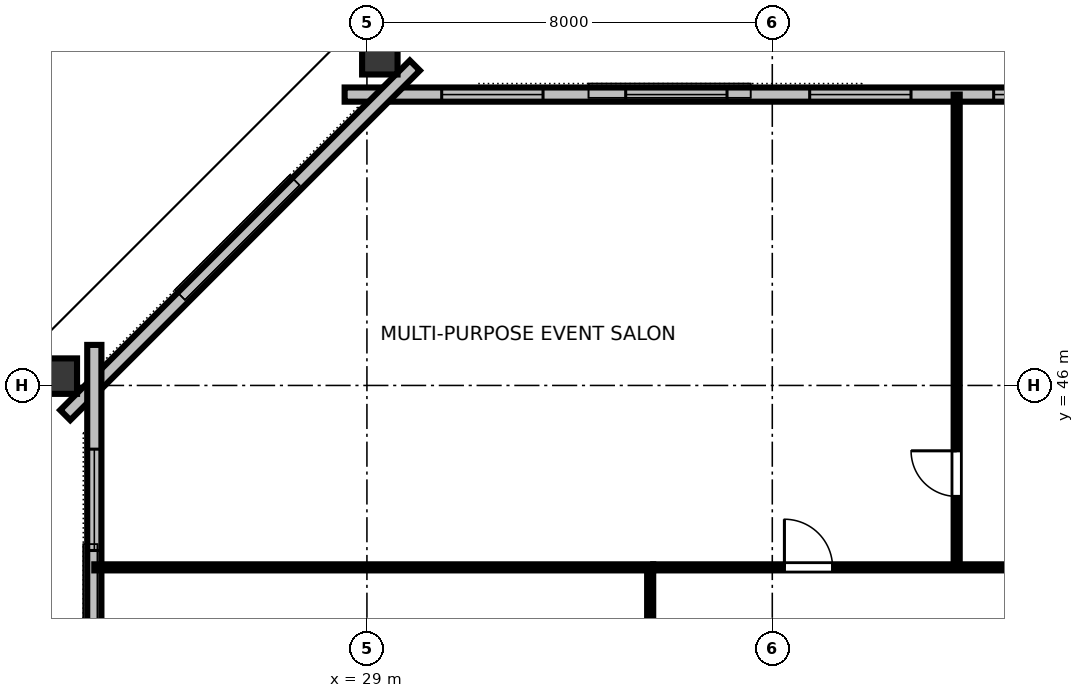
"""IFC4 building model, lengths in metres.
Left out: names, types, materials, properties, quantities, classifications, styles, units other than length and angle.
Written with IfcOpenShell. Run it as: python <this file> out.ifc"""

import sys

from ifc_helpers import new_model, si_unit, direction, frame, frame_2d, origin, origin_2d, place, context, subcontext, project, spatial, rectangle, hollow_rectangle, extrude, element, fill, save


model = new_model("IFC4")
c1 = context("Model", 3, precision=1e-05, world=origin(), true_north=direction((0.0, 1.0)))
c2 = subcontext(c1, "Body", "Model", "MODEL_VIEW")
j1 = project(units=[si_unit("LENGTHUNIT", "METRE"), si_unit("PLANEANGLEUNIT", "RADIAN")], contexts=[c1])
p1 = place(None, origin())
s1 = spatial("IfcSite", under=j1, at=p1, CompositionType="ELEMENT")
p2 = place(p1, origin())
s2 = spatial("IfcBuilding", under=s1, at=p2, CompositionType="ELEMENT")
p3 = place(p2, frame((0.0, 0.0, 177.0)))
s3 = spatial("IfcBuildingStorey", under=s2, at=p3, CompositionType="ELEMENT", Elevation=177.0)
for number, where, z_axis, x_axis in (
    (1, (29.255, 52.562, 0.0), (0.0, 0.0, 1.0), (1.0, 0.0, 0.0)),
    (2, (22.854, 46.184, 0.0), (0.0, 0.0, 1.0), (0.0, 1.0, 0.0)),
):
    element("IfcColumn", number, at=place(p3, frame(where, z_axis=z_axis, x_axis=x_axis)), inside=s3, PredefinedType="COLUMN", context=c2, shape_type="SweptSolid", body=[
        extrude(hollow_rectangle(XDim=0.7, YDim=0.85, WallThickness=0.04, at=origin_2d()), origin(), (0.0, 0.0, 1.0), 3.358),
    ])
p4 = place(p3, frame((63.44, 51.74, 0.0), z_axis=(0.0, 0.0, 1.0), x_axis=(-1.0, 0.0, 0.0)))
e3 = element("IfcWall", 3, at=p4, inside=s3, PredefinedType="STANDARD", context=c2, shape_type="SweptSolid", body=[
    extrude(rectangle(XDim=34.88, YDim=0.28, at=frame_2d((17.44, 0.0))), origin(), (0.0, 0.0, 1.0), 3.36),
])
p5 = place(p4, frame((1.916, 0.0, 0.8)))
e4 = element("IfcOpeningElement", 4, at=p5, cuts=e3, PredefinedType="OPENING", context=c2, shape_type="SweptSolid", body=[
    extrude(rectangle(XDim=2.0, YDim=1.95, at=frame_2d((1.0, 0.975))), frame((0.0, 0.15, 0.0), z_axis=(0.0, -1.0, 0.0), x_axis=(1.0, 0.0, 0.0)), (0.0, 0.0, 1.0), 0.3),
])
p6 = place(p4, frame((5.547, 0.0, 0.8)))
e5 = element("IfcOpeningElement", 5, at=p6, cuts=e3, PredefinedType="OPENING", context=c2, shape_type="SweptSolid", body=[
    extrude(rectangle(XDim=2.0, YDim=1.95, at=frame_2d((1.0, 0.975))), frame((0.0, 0.15, 0.0), z_axis=(0.0, -1.0, 0.0), x_axis=(1.0, 0.0, 0.0)), (0.0, 0.0, 1.0), 0.3),
])
p7 = place(p4, frame((9.178, 0.0, 0.8)))
e6 = element("IfcOpeningElement", 6, at=p7, cuts=e3, PredefinedType="OPENING", context=c2, shape_type="SweptSolid", body=[
    extrude(rectangle(XDim=2.0, YDim=1.95, at=frame_2d((1.0, 0.975))), frame((0.0, 0.15, 0.0), z_axis=(0.0, -1.0, 0.0), x_axis=(1.0, 0.0, 0.0)), (0.0, 0.0, 1.0), 0.3),
])
p8 = place(p4, frame((12.809, 0.0, 0.8)))
e7 = element("IfcOpeningElement", 7, at=p8, cuts=e3, PredefinedType="OPENING", context=c2, shape_type="SweptSolid", body=[
    extrude(rectangle(XDim=2.0, YDim=1.95, at=frame_2d((1.0, 0.975))), frame((0.0, 0.15, 0.0), z_axis=(0.0, -1.0, 0.0), x_axis=(1.0, 0.0, 0.0)), (0.0, 0.0, 1.0), 0.3),
])
p9 = place(p4, frame((20.071, 0.0, 0.8)))
e8 = element("IfcOpeningElement", 8, at=p9, cuts=e3, PredefinedType="OPENING", context=c2, shape_type="SweptSolid", body=[
    extrude(rectangle(XDim=2.0, YDim=1.95, at=frame_2d((1.0, 0.975))), frame((0.0, 0.15, 0.0), z_axis=(0.0, -1.0, 0.0), x_axis=(1.0, 0.0, 0.0)), (0.0, 0.0, 1.0), 0.3),
])
p10 = place(p4, frame((23.702, 0.0, 0.8)))
e9 = element("IfcOpeningElement", 9, at=p10, cuts=e3, PredefinedType="OPENING", context=c2, shape_type="SweptSolid", body=[
    extrude(rectangle(XDim=2.0, YDim=1.95, at=frame_2d((1.0, 0.975))), frame((0.0, 0.15, 0.0), z_axis=(0.0, -1.0, 0.0), x_axis=(1.0, 0.0, 0.0)), (0.0, 0.0, 1.0), 0.3),
])
p11 = place(p4, frame((27.333, 0.0, 0.8)))
e10 = element("IfcOpeningElement", 10, at=p11, cuts=e3, PredefinedType="OPENING", context=c2, shape_type="SweptSolid", body=[
    extrude(rectangle(XDim=2.0, YDim=1.95, at=frame_2d((1.0, 0.975))), frame((0.0, 0.15, 0.0), z_axis=(0.0, -1.0, 0.0), x_axis=(1.0, 0.0, 0.0)), (0.0, 0.0, 1.0), 0.3),
])
p12 = place(p4, frame((30.964, 0.0, 0.8)))
e11 = element("IfcOpeningElement", 11, at=p12, cuts=e3, PredefinedType="OPENING", context=c2, shape_type="SweptSolid", body=[
    extrude(rectangle(XDim=2.0, YDim=1.95, at=frame_2d((1.0, 0.975))), frame((0.0, 0.15, 0.0), z_axis=(0.0, -1.0, 0.0), x_axis=(1.0, 0.0, 0.0)), (0.0, 0.0, 1.0), 0.3),
])
p13 = place(p3, frame((29.946, 52.314, 0.0), z_axis=(0.0, 0.0, 1.0), x_axis=(-0.707106781187, -0.707106781187, 0.0)))
e12 = element("IfcWall", 12, at=p13, inside=s3, PredefinedType="STANDARD", context=c2, shape_type="SweptSolid", body=[
    extrude(rectangle(XDim=9.757, YDim=0.28, at=frame_2d((4.879, 0.0))), origin(), (0.0, 0.0, 1.0), 3.36),
])
p14 = place(p3, frame((23.62, 46.8, 0.0), z_axis=(0.0, 0.0, 1.0), x_axis=(0.0, -1.0, 0.0)))
e13 = element("IfcWall", 13, at=p14, inside=s3, PredefinedType="STANDARD", context=c2, shape_type="SweptSolid", body=[
    extrude(rectangle(XDim=29.6, YDim=0.28, at=frame_2d((14.8, 0.0))), origin(), (0.0, 0.0, 1.0), 3.36),
])
p15 = place(p14, frame((2.057, 0.0, 0.8)))
e14 = element("IfcOpeningElement", 14, at=p15, cuts=e13, PredefinedType="OPENING", context=c2, shape_type="SweptSolid", body=[
    extrude(rectangle(XDim=2.0, YDim=1.95, at=frame_2d((1.0, 0.975))), frame((0.0, 0.15, 0.0), z_axis=(0.0, -1.0, 0.0), x_axis=(1.0, 0.0, 0.0)), (0.0, 0.0, 1.0), 0.3),
])
p16 = place(p14, frame((5.971, 0.0, 0.8)))
e15 = element("IfcOpeningElement", 15, at=p16, cuts=e13, PredefinedType="OPENING", context=c2, shape_type="SweptSolid", body=[
    extrude(rectangle(XDim=2.0, YDim=1.95, at=frame_2d((1.0, 0.975))), frame((0.0, 0.15, 0.0), z_axis=(0.0, -1.0, 0.0), x_axis=(1.0, 0.0, 0.0)), (0.0, 0.0, 1.0), 0.3),
])
p17 = place(p14, frame((9.886, 0.0, 0.8)))
e16 = element("IfcOpeningElement", 16, at=p17, cuts=e13, PredefinedType="OPENING", context=c2, shape_type="SweptSolid", body=[
    extrude(rectangle(XDim=2.0, YDim=1.95, at=frame_2d((1.0, 0.975))), frame((0.0, 0.15, 0.0), z_axis=(0.0, -1.0, 0.0), x_axis=(1.0, 0.0, 0.0)), (0.0, 0.0, 1.0), 0.3),
])
p18 = place(p14, frame((17.714, 0.0, 0.8)))
e17 = element("IfcOpeningElement", 17, at=p18, cuts=e13, PredefinedType="OPENING", context=c2, shape_type="SweptSolid", body=[
    extrude(rectangle(XDim=2.0, YDim=1.95, at=frame_2d((1.0, 0.975))), frame((0.0, 0.15, 0.0), z_axis=(0.0, -1.0, 0.0), x_axis=(1.0, 0.0, 0.0)), (0.0, 0.0, 1.0), 0.3),
])
p19 = place(p14, frame((21.629, 0.0, 0.8)))
e18 = element("IfcOpeningElement", 18, at=p19, cuts=e13, PredefinedType="OPENING", context=c2, shape_type="SweptSolid", body=[
    extrude(rectangle(XDim=2.0, YDim=1.95, at=frame_2d((1.0, 0.975))), frame((0.0, 0.15, 0.0), z_axis=(0.0, -1.0, 0.0), x_axis=(1.0, 0.0, 0.0)), (0.0, 0.0, 1.0), 0.3),
])
p20 = place(p14, frame((25.543, 0.0, 0.8)))
e19 = element("IfcOpeningElement", 19, at=p20, cuts=e13, PredefinedType="OPENING", context=c2, shape_type="SweptSolid", body=[
    extrude(rectangle(XDim=2.0, YDim=1.95, at=frame_2d((1.0, 0.975))), frame((0.0, 0.15, 0.0), z_axis=(0.0, -1.0, 0.0), x_axis=(1.0, 0.0, 0.0)), (0.0, 0.0, 1.0), 0.3),
])
p21 = place(p3, frame((40.639, 42.41, 0.0), z_axis=(0.0, 0.0, 1.0), x_axis=(0.0, 1.0, 0.0)))
e20 = element("IfcWall", 20, at=p21, inside=s3, PredefinedType="PARTITIONING", context=c2, shape_type="SweptSolid", body=[
    extrude(rectangle(XDim=9.33, YDim=0.12, at=frame_2d((4.665, 0.0))), origin(), (0.0, 0.0, 1.0), 2.64),
])
p22 = place(p21, frame((1.4, 0.0, 0.0)))
e21 = element("IfcOpeningElement", 21, at=p22, cuts=e20, PredefinedType="OPENING", context=c2, shape_type="SweptSolid", body=[
    extrude(rectangle(XDim=0.9, YDim=2.15, at=frame_2d((0.45, 1.075))), frame((0.0, 0.07, 0.0), z_axis=(0.0, -1.0, 0.0), x_axis=(1.0, 0.0, 0.0)), (0.0, 0.0, 1.0), 0.14),
])
p23 = place(p3, frame((34.65, 42.41, 0.0), z_axis=(0.0, 0.0, 1.0), x_axis=(1.0, 0.0, 0.0)))
e22 = element("IfcWall", 22, at=p23, inside=s3, PredefinedType="PARTITIONING", context=c2, shape_type="SweptSolid", body=[
    extrude(rectangle(XDim=10.33, YDim=0.12, at=frame_2d((5.165, 0.0))), origin(), (0.0, 0.0, 1.0), 2.64),
])
p24 = place(p23, frame((2.59, 0.0, 0.0)))
e23 = element("IfcOpeningElement", 23, at=p24, cuts=e22, PredefinedType="OPENING", context=c2, shape_type="SweptSolid", body=[
    extrude(rectangle(XDim=0.95, YDim=2.15, at=frame_2d((0.475, 1.075))), frame((0.0, 0.07, 0.0), z_axis=(0.0, -1.0, 0.0), x_axis=(1.0, 0.0, 0.0)), (0.0, 0.0, 1.0), 0.14),
])
p25 = place(p23, frame((7.685, 0.0, 0.0)))
e24 = element("IfcOpeningElement", 24, at=p25, cuts=e22, PredefinedType="OPENING", context=c2, shape_type="SweptSolid", body=[
    extrude(rectangle(XDim=0.95, YDim=2.15, at=frame_2d((0.475, 1.075))), frame((0.0, 0.07, 0.0), z_axis=(0.0, -1.0, 0.0), x_axis=(1.0, 0.0, 0.0)), (0.0, 0.0, 1.0), 0.14),
])
p26 = place(p3, frame((34.59, 21.65, 0.0), z_axis=(0.0, 0.0, 1.0), x_axis=(0.0, 1.0, 0.0)))
e25 = element("IfcWall", 25, at=p26, inside=s3, PredefinedType="PARTITIONING", context=c2, shape_type="SweptSolid", body=[
    extrude(rectangle(XDim=20.7, YDim=0.12, at=frame_2d((10.35, 0.0))), origin(), (0.0, 0.0, 1.0), 2.64),
])
p27 = place(p26, frame((9.875, 0.0, 0.0)))
e26 = element("IfcOpeningElement", 26, at=p27, cuts=e25, PredefinedType="OPENING", context=c2, shape_type="SweptSolid", body=[
    extrude(rectangle(XDim=0.95, YDim=2.15, at=frame_2d((0.475, 1.075))), frame((0.0, 0.07, 0.0), z_axis=(0.0, -1.0, 0.0), x_axis=(1.0, 0.0, 0.0)), (0.0, 0.0, 1.0), 0.14),
])
p28 = place(p3, frame((34.65, 42.41, 0.0), z_axis=(0.0, 0.0, 1.0), x_axis=(-1.0, 0.0, 0.0)))
e27 = element("IfcWall", 27, at=p28, inside=s3, PredefinedType="PARTITIONING", context=c2, shape_type="SweptSolid", body=[
    extrude(rectangle(XDim=11.03, YDim=0.12, at=frame_2d((5.515, 0.0))), origin(), (0.0, 0.0, 1.0), 2.64),
])
p29 = place(p9, origin())
e28 = element("IfcWindow", 28, at=p29, inside=s3, PartitioningType="SINGLE_PANEL", PredefinedType="WINDOW", context=c2, shape_type="SweptSolid", body=[
    extrude(rectangle(XDim=2.0, YDim=1.95, at=frame_2d((1.0, 0.975))), frame((0.0, 0.03, 0.0), z_axis=(0.0, -1.0, 0.0), x_axis=(1.0, 0.0, 0.0)), (0.0, 0.0, 1.0), 0.06),
])
fill(e8, e28)
p30 = place(p10, origin())
e29 = element("IfcWindow", 29, at=p30, inside=s3, PartitioningType="SINGLE_PANEL", PredefinedType="WINDOW", context=c2, shape_type="SweptSolid", body=[
    extrude(rectangle(XDim=2.0, YDim=1.95, at=frame_2d((1.0, 0.975))), frame((0.0, 0.03, 0.0), z_axis=(0.0, -1.0, 0.0), x_axis=(1.0, 0.0, 0.0)), (0.0, 0.0, 1.0), 0.06),
])
fill(e9, e29)
p31 = place(p11, origin())
e30 = element("IfcWindow", 30, at=p31, inside=s3, PartitioningType="SINGLE_PANEL", PredefinedType="WINDOW", context=c2, shape_type="SweptSolid", body=[
    extrude(rectangle(XDim=2.0, YDim=1.95, at=frame_2d((1.0, 0.975))), frame((0.0, 0.03, 0.0), z_axis=(0.0, -1.0, 0.0), x_axis=(1.0, 0.0, 0.0)), (0.0, 0.0, 1.0), 0.06),
])
fill(e10, e30)
p32 = place(p12, origin())
e31 = element("IfcWindow", 31, at=p32, inside=s3, PartitioningType="SINGLE_PANEL", PredefinedType="WINDOW", context=c2, shape_type="SweptSolid", body=[
    extrude(rectangle(XDim=2.0, YDim=1.95, at=frame_2d((1.0, 0.975))), frame((0.0, 0.03, 0.0), z_axis=(0.0, -1.0, 0.0), x_axis=(1.0, 0.0, 0.0)), (0.0, 0.0, 1.0), 0.06),
])
fill(e11, e31)
p33 = place(p15, origin())
e32 = element("IfcWindow", 32, at=p33, inside=s3, PartitioningType="SINGLE_PANEL", PredefinedType="WINDOW", context=c2, shape_type="SweptSolid", body=[
    extrude(rectangle(XDim=2.0, YDim=1.95, at=frame_2d((1.0, 0.975))), frame((0.0, 0.03, 0.0), z_axis=(0.0, -1.0, 0.0), x_axis=(1.0, 0.0, 0.0)), (0.0, 0.0, 1.0), 0.06),
])
fill(e14, e32)
p34 = place(p22, origin())
e33 = element("IfcDoor", 33, at=p34, inside=s3, OperationType="SINGLE_SWING_RIGHT", PredefinedType="DOOR", context=c2, shape_type="SweptSolid", body=[
    extrude(rectangle(XDim=0.9, YDim=2.15, at=frame_2d((0.45, 1.075))), frame((0.0, 0.025, 0.0), z_axis=(0.0, -1.0, 0.0), x_axis=(1.0, 0.0, 0.0)), (0.0, 0.0, 1.0), 0.05),
])
fill(e21, e33)
p35 = place(p24, origin())
e34 = element("IfcDoor", 34, at=p35, inside=s3, OperationType="SINGLE_SWING_LEFT", PredefinedType="DOOR", context=c2, shape_type="SweptSolid", body=[
    extrude(rectangle(XDim=0.95, YDim=2.15, at=frame_2d((0.475, 1.075))), frame((0.0, 0.025, 0.0), z_axis=(0.0, -1.0, 0.0), x_axis=(1.0, 0.0, 0.0)), (0.0, 0.0, 1.0), 0.05),
])
fill(e23, e34)
save(model, sys.argv[1])
